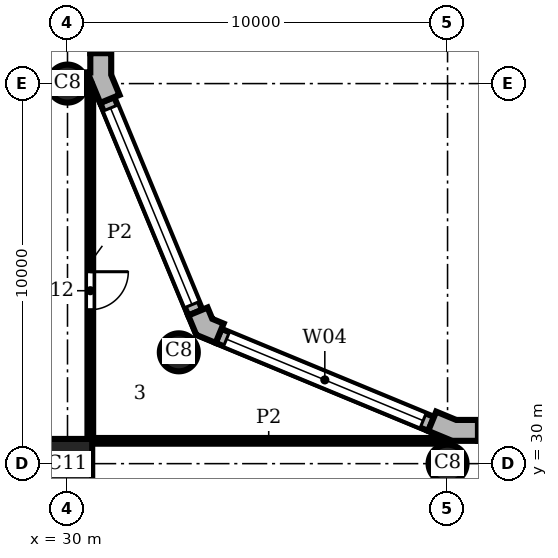
"""IFC4 building model, lengths in metres.
Left out: names, types, materials, properties, quantities, classifications, styles, units other than length and angle.
Written with IfcOpenShell. Run it as: python <this file> out.ifc"""

import sys

from ifc_helpers import new_model, si_unit, direction, frame, frame_2d, origin, origin_2d, place, context, subcontext, project, spatial, polyline, rectangle, circle, outline, extrude, element, fill, save


model = new_model("IFC4")
c1 = context("Model", 3, precision=1e-05, world=origin(), true_north=direction((0.0, 1.0)))
c2 = subcontext(c1, "Body", "Model", "MODEL_VIEW")
j1 = project(units=[si_unit("LENGTHUNIT", "METRE"), si_unit("PLANEANGLEUNIT", "RADIAN")], contexts=[c1])
p1 = place(None, origin())
s1 = spatial("IfcSite", under=j1, at=p1, CompositionType="ELEMENT")
p2 = place(p1, origin())
s2 = spatial("IfcBuilding", under=s1, at=p2, CompositionType="ELEMENT")
p3 = place(p2, frame((0.0, 0.0, 233.1)))
s3 = spatial("IfcBuildingStorey", under=s2, at=p3, CompositionType="ELEMENT", Elevation=233.1)
for number, where, z_axis, x_axis in (
    (1, (40.0, 30.0, 0.0), (0.0, 0.0, 1.0), (1.0, 0.0, 0.0)),
    (2, (32.929, 32.929, 0.0), (0.0, 0.0, 1.0), (1.0, 0.0, 0.0)),
    (3, (30.0, 40.0, 0.0), (0.0, 0.0, 1.0), (1.0, 0.0, 0.0)),
):
    element("IfcColumn", number, at=place(p3, frame(where, z_axis=z_axis, x_axis=x_axis)), inside=s3, PredefinedType="COLUMN", context=c2, shape_type="SweptSolid", body=[
        extrude(circle(Radius=0.5, at=origin_2d()), origin(), (0.0, 0.0, 1.0), 3.9),
    ])
p4 = place(p3, frame((30.0, 30.0, 0.0), z_axis=(0.0, 0.0, 1.0), x_axis=(1.0, 0.0, 0.0)))
e4 = element("IfcColumn", 4, at=p4, inside=s3, PredefinedType="COLUMN", context=c2, shape_type="SweptSolid", body=[
    extrude(rectangle(XDim=1.3, YDim=1.3, at=origin_2d()), origin(), (0.0, 0.0, 1.0), 3.9),
])
p5 = place(p3, origin())
e5 = element("IfcWall", 5, at=p5, inside=s3, PredefinedType="SOLIDWALL", context=c2, shape_type="SweptSolid", body=[
    extrude(outline(polyline([(40.8, 31.0), (40.8, 31.15), (40.229, 31.15), (39.701, 31.369), (39.644, 31.23), (39.49, 30.861), (40.119, 30.6), (40.8, 30.6), (40.8, 31.0)])), origin(), (0.0, 0.0, 1.0), 3.9),
])
e6 = element("IfcWall", 6, at=p5, inside=s3, PredefinedType="SOLIDWALL", context=c2, shape_type="SweptSolid", body=[
    extrude(outline(polyline([(34.051, 33.547), (34.108, 33.685), (33.809, 33.809), (33.685, 34.108), (33.547, 34.051), (33.177, 33.898), (33.388, 33.388), (33.898, 33.177), (34.051, 33.547)])), origin(), (0.0, 0.0, 1.0), 3.9),
])
e7 = element("IfcWall", 7, at=p5, inside=s3, PredefinedType="SOLIDWALL", context=c2, shape_type="SweptSolid", body=[
    extrude(outline(polyline([(30.62, 39.995), (30.62, 40.071), (30.861, 39.49), (31.23, 39.644), (31.369, 39.701), (31.15, 40.229), (31.15, 40.8), (31.0, 40.8), (30.6, 40.8), (30.6, 40.295), (30.5, 40.295), (30.5, 39.995), (30.62, 39.995)])), origin(), (0.0, 0.0, 1.0), 3.9),
])
p6 = place(p3, frame((59.2, 30.8, 0.0), z_axis=(0.0, 0.0, 1.0), x_axis=(-1.0, 0.0, 0.0)))
e8 = element("IfcWall", 8, at=p6, inside=s3, PredefinedType="SOLIDWALL", context=c2, shape_type="SweptSolid", body=[
    extrude(rectangle(XDim=18.4, YDim=0.4, at=frame_2d((9.2, 0.0))), origin(), (0.0, 0.0, 1.0), 3.9),
])
p7 = place(p6, frame((0.2, 0.0, 0.9)))
e9 = element("IfcOpeningElement", 9, at=p7, cuts=e8, PredefinedType="OPENING", context=c2, shape_type="SweptSolid", body=[
    extrude(rectangle(XDim=8.0, YDim=2.35, at=frame_2d((4.0, 1.175))), frame((0.0, 0.21, 0.0), z_axis=(0.0, -1.0, 0.0), x_axis=(1.0, 0.0, 0.0)), (0.0, 0.0, 1.0), 0.42),
])
p8 = place(p6, frame((10.2, 0.0, 0.9)))
e10 = element("IfcOpeningElement", 10, at=p8, cuts=e8, PredefinedType="OPENING", context=c2, shape_type="SweptSolid", body=[
    extrude(rectangle(XDim=8.0, YDim=2.35, at=frame_2d((4.0, 1.175))), frame((0.0, 0.21, 0.0), z_axis=(0.0, -1.0, 0.0), x_axis=(1.0, 0.0, 0.0)), (0.0, 0.0, 1.0), 0.42),
])
p9 = place(p3, frame((39.567, 31.045, 0.0), z_axis=(0.0, 0.0, 1.0), x_axis=(-0.923891000409, 0.382655745237, 0.0)))
e11 = element("IfcWall", 11, at=p9, inside=s3, PredefinedType="SOLIDWALL", context=c2, shape_type="SweptSolid", body=[
    extrude(rectangle(XDim=6.053, YDim=0.4, at=frame_2d((3.027, 0.0))), origin(), (0.0, 0.0, 1.0), 3.9),
])
p10 = place(p9, frame((0.227, 0.0, 0.9)))
e12 = element("IfcOpeningElement", 12, at=p10, cuts=e11, PredefinedType="OPENING", context=c2, shape_type="SweptSolid", body=[
    extrude(rectangle(XDim=5.6, YDim=2.35, at=frame_2d((2.8, 1.175))), frame((0.0, 0.21, 0.0), z_axis=(0.0, -1.0, 0.0), x_axis=(1.0, 0.0, 0.0)), (0.0, 0.0, 1.0), 0.42),
])
p11 = place(p3, frame((33.362, 33.974, 0.0), z_axis=(0.0, 0.0, 1.0), x_axis=(-0.382655745237, 0.923891000409, 0.0)))
e13 = element("IfcWall", 13, at=p11, inside=s3, PredefinedType="SOLIDWALL", context=c2, shape_type="SweptSolid", body=[
    extrude(rectangle(XDim=6.053, YDim=0.4, at=frame_2d((3.027, 0.0))), origin(), (0.0, 0.0, 1.0), 3.9),
])
p12 = place(p11, frame((0.227, 0.0, 0.9)))
e14 = element("IfcOpeningElement", 14, at=p12, cuts=e13, PredefinedType="OPENING", context=c2, shape_type="SweptSolid", body=[
    extrude(rectangle(XDim=5.6, YDim=2.35, at=frame_2d((2.8, 1.175))), frame((0.0, 0.21, 0.0), z_axis=(0.0, -1.0, 0.0), x_axis=(1.0, 0.0, 0.0)), (0.0, 0.0, 1.0), 0.42),
])
p13 = place(p3, frame((30.8, 40.8, 0.0), z_axis=(0.0, 0.0, 1.0), x_axis=(0.0, 1.0, 0.0)))
e15 = element("IfcWall", 15, at=p13, inside=s3, PredefinedType="SOLIDWALL", context=c2, shape_type="SweptSolid", body=[
    extrude(rectangle(XDim=18.4, YDim=0.4, at=frame_2d((9.2, 0.0))), origin(), (0.0, 0.0, 1.0), 3.9),
])
p14 = place(p13, frame((0.2, 0.0, 0.9)))
e16 = element("IfcOpeningElement", 16, at=p14, cuts=e15, PredefinedType="OPENING", context=c2, shape_type="SweptSolid", body=[
    extrude(rectangle(XDim=8.0, YDim=2.35, at=frame_2d((4.0, 1.175))), frame((0.0, 0.21, 0.0), z_axis=(0.0, -1.0, 0.0), x_axis=(1.0, 0.0, 0.0)), (0.0, 0.0, 1.0), 0.42),
])
p15 = place(p13, frame((10.2, 0.0, 0.9)))
e17 = element("IfcOpeningElement", 17, at=p15, cuts=e15, PredefinedType="OPENING", context=c2, shape_type="SweptSolid", body=[
    extrude(rectangle(XDim=8.0, YDim=2.35, at=frame_2d((4.0, 1.175))), frame((0.0, 0.21, 0.0), z_axis=(0.0, -1.0, 0.0), x_axis=(1.0, 0.0, 0.0)), (0.0, 0.0, 1.0), 0.42),
])
p16 = place(p3, frame((30.6, 30.65, 0.0), z_axis=(0.0, 0.0, 1.0), x_axis=(0.0, 1.0, 0.0)))
e18 = element("IfcWall", 18, at=p16, inside=s3, PredefinedType="PARTITIONING", context=c2, shape_type="SweptSolid", body=[
    extrude(rectangle(XDim=9.288, YDim=0.15, at=frame_2d((4.644, 0.0))), origin(), (0.0, 0.0, 1.0), 3.45),
])
p17 = place(p16, frame((3.4, 0.0, 0.0)))
e19 = element("IfcOpeningElement", 19, at=p17, cuts=e18, PredefinedType="OPENING", context=c2, shape_type="SweptSolid", body=[
    extrude(rectangle(XDim=1.0, YDim=2.1, at=frame_2d((0.5, 1.05))), frame((0.0, 0.085, 0.0), z_axis=(0.0, -1.0, 0.0), x_axis=(1.0, 0.0, 0.0)), (0.0, 0.0, 1.0), 0.17),
])
p18 = place(p3, frame((30.65, 30.6, 0.0), z_axis=(0.0, 0.0, 1.0), x_axis=(1.0, 0.0, 0.0)))
e20 = element("IfcWall", 20, at=p18, inside=s3, PredefinedType="PARTITIONING", context=c2, shape_type="SweptSolid", body=[
    extrude(rectangle(XDim=9.288, YDim=0.15, at=frame_2d((4.644, 0.0))), origin(), (0.0, 0.0, 1.0), 3.45),
])
p19 = place(p10, origin())
e21 = element("IfcWindow", 21, at=p19, inside=s3, PartitioningType="SINGLE_PANEL", PredefinedType="WINDOW", context=c2, shape_type="SweptSolid", body=[
    extrude(rectangle(XDim=5.6, YDim=2.35, at=frame_2d((2.8, 1.175))), frame((0.0, 0.16, 0.0), z_axis=(0.0, -1.0, 0.0), x_axis=(1.0, 0.0, 0.0)), (0.0, 0.0, 1.0), 0.06),
])
fill(e12, e21)
p20 = place(p12, origin())
e22 = element("IfcWindow", 22, at=p20, inside=s3, PartitioningType="SINGLE_PANEL", PredefinedType="WINDOW", context=c2, shape_type="SweptSolid", body=[
    extrude(rectangle(XDim=5.6, YDim=2.35, at=frame_2d((2.8, 1.175))), frame((0.0, 0.16, 0.0), z_axis=(0.0, -1.0, 0.0), x_axis=(1.0, 0.0, 0.0)), (0.0, 0.0, 1.0), 0.06),
])
fill(e14, e22)
p21 = place(p17, frame((1.0, 0.0, 0.0), z_axis=(0.0, 0.0, 1.0), x_axis=(-1.0, 0.0, 0.0)))
e23 = element("IfcDoor", 23, at=p21, inside=s3, OperationType="SINGLE_SWING_LEFT", PredefinedType="DOOR", context=c2, shape_type="SweptSolid", body=[
    extrude(rectangle(XDim=1.0, YDim=2.1, at=frame_2d((0.5, 1.05))), frame((0.0, 0.025, 0.0), z_axis=(0.0, -1.0, 0.0), x_axis=(1.0, 0.0, 0.0)), (0.0, 0.0, 1.0), 0.05),
])
fill(e19, e23)
save(model, sys.argv[1])
